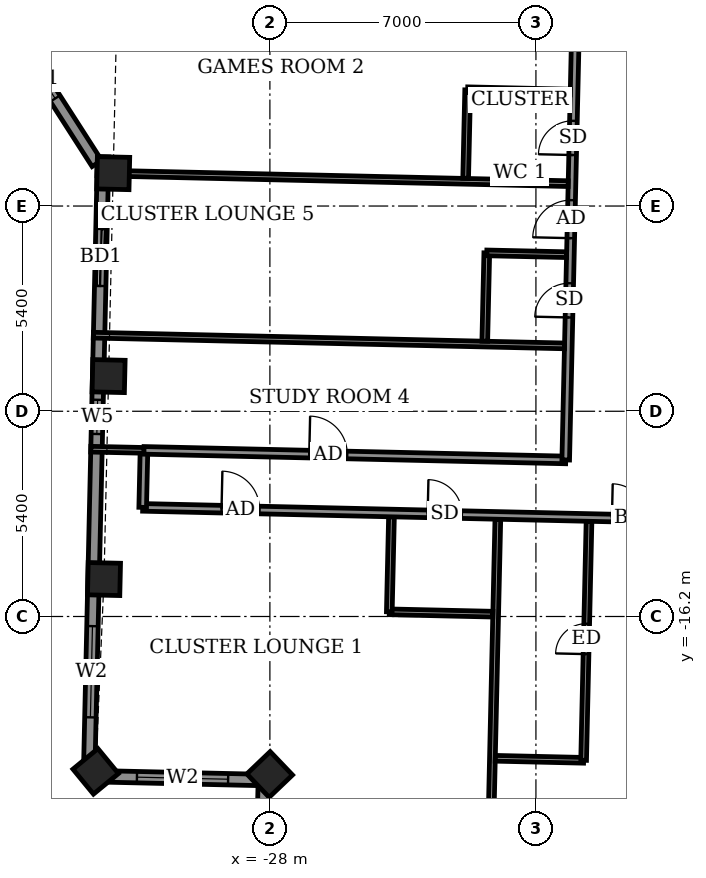
"""IFC4 building model, lengths in metres.
Left out: names, types, materials, properties, quantities, classifications, styles, units other than length and angle.
Written with IfcOpenShell. Run it as: python <this file> out.ifc"""

import sys

from ifc_helpers import new_model, si_unit, direction, frame, frame_2d, origin, origin_2d, place, context, subcontext, project, spatial, rectangle, extrude, element, fill, save


model = new_model("IFC4")
c1 = context("Model", 3, precision=1e-05, world=origin(), true_north=direction((0.0, 1.0)))
c2 = subcontext(c1, "Body", "Model", "MODEL_VIEW")
j1 = project(units=[si_unit("LENGTHUNIT", "METRE"), si_unit("PLANEANGLEUNIT", "RADIAN")], contexts=[c1])
p1 = place(None, origin())
s1 = spatial("IfcSite", under=j1, at=p1, CompositionType="ELEMENT")
p2 = place(p1, origin())
s2 = spatial("IfcBuilding", under=s1, at=p2, CompositionType="ELEMENT")
p3 = place(p2, frame((0.0, 0.0, 316.9)))
s3 = spatial("IfcBuildingStorey", under=s2, at=p3, CompositionType="ELEMENT", Elevation=316.9)
for number, where, z_axis, x_axis in (
    (1, (-32.123, -4.535, -0.55), (0.0, 0.0, 1.0), (-0.023, -1.0, 0.0)),
    (2, (-32.244, -9.875, -0.55), (0.0, 0.0, 1.0), (-0.023, -1.0, 0.0)),
    (3, (-32.365, -15.215, -0.55), (0.0, 0.0, 1.0), (-0.023, -1.0, 0.0)),
    (4, (-32.584, -20.275, -0.55), (0.0, 0.0, 1.0), (0.635, -0.772, 0.0)),
    (5, (-28.006, -20.356, -0.55), (0.0, 0.0, 1.0), (0.691, -0.723, 0.0)),
):
    element("IfcColumn", number, at=place(p3, frame(where, z_axis=z_axis, x_axis=x_axis)), inside=s3, PredefinedType="COLUMN", context=c2, shape_type="SweptSolid", body=[
        extrude(rectangle(XDim=0.85, YDim=0.85, at=origin_2d()), origin(), (0.0, 0.0, 1.0), 3.6),
    ])
p4 = place(p3, frame((-34.481, -1.277, 0.0), z_axis=(0.0, 0.0, 1.0), x_axis=(0.540460234606, -0.841369558999, 0.0)))
e6 = element("IfcWall", 6, at=p4, inside=s3, PredefinedType="SOLIDWALL", context=c2, shape_type="SweptSolid", body=[
    extrude(rectangle(XDim=3.569, YDim=0.3, at=frame_2d((1.785, 0.0))), origin(), (0.0, 0.0, 1.0), 3.05),
])
p5 = place(p4, frame((0.338, 0.0, 0.9)))
e7 = element("IfcOpeningElement", 7, at=p5, cuts=e6, PredefinedType="OPENING", context=c2, shape_type="SweptSolid", body=[
    extrude(rectangle(XDim=1.2, YDim=1.5, at=frame_2d((0.6, 0.75))), frame((0.0, 0.16, 0.0), z_axis=(0.0, -1.0, 0.0), x_axis=(1.0, 0.0, 0.0)), (0.0, 0.0, 1.0), 0.32),
])
p6 = place(p3, frame((-32.388, -4.104, 0.0), z_axis=(0.0, 0.0, 1.0), x_axis=(-0.02270779533, -0.999742144771, 0.0)))
e8 = element("IfcWall", 8, at=p6, inside=s3, PredefinedType="SOLIDWALL", context=c2, shape_type="SweptSolid", body=[
    extrude(rectangle(XDim=16.299, YDim=0.3, at=frame_2d((8.149, 0.0))), origin(), (0.0, 0.0, 1.0), 2.55),
])
p7 = place(p6, frame((1.9, 0.0, 0.0)))
e9 = element("IfcOpeningElement", 9, at=p7, cuts=e8, PredefinedType="OPENING", context=c2, shape_type="SweptSolid", body=[
    extrude(rectangle(XDim=1.5, YDim=2.4, at=frame_2d((0.75, 1.2))), frame((0.0, 0.16, 0.0), z_axis=(0.0, -1.0, 0.0), x_axis=(1.0, 0.0, 0.0)), (0.0, 0.0, 1.0), 0.32),
])
p8 = place(p6, frame((6.396, 0.0, 0.9)))
e10 = element("IfcOpeningElement", 10, at=p8, cuts=e8, PredefinedType="OPENING", context=c2, shape_type="SweptSolid", body=[
    extrude(rectangle(XDim=0.9, YDim=1.5, at=frame_2d((0.45, 0.75))), frame((0.0, 0.16, 0.0), z_axis=(0.0, -1.0, 0.0), x_axis=(1.0, 0.0, 0.0)), (0.0, 0.0, 1.0), 0.32),
])
p9 = place(p6, frame((12.353, 0.0, 0.9)))
e11 = element("IfcOpeningElement", 11, at=p9, cuts=e8, PredefinedType="OPENING", context=c2, shape_type="SweptSolid", body=[
    extrude(rectangle(XDim=2.4, YDim=1.5, at=frame_2d((1.2, 0.75))), frame((0.0, 0.16, 0.0), z_axis=(0.0, -1.0, 0.0), x_axis=(1.0, 0.0, 0.0)), (0.0, 0.0, 1.0), 0.32),
])
p10 = place(p3, frame((-32.758, -20.399, 0.0), z_axis=(0.0, 0.0, 1.0), x_axis=(0.999744404568, -0.02260808559, 0.0)))
e12 = element("IfcWall", 12, at=p10, inside=s3, PredefinedType="SOLIDWALL", context=c2, shape_type="SweptSolid", body=[
    extrude(rectangle(XDim=4.6, YDim=0.3, at=frame_2d((2.3, 0.0))), origin(), (0.0, 0.0, 1.0), 2.55),
])
p11 = place(p10, frame((1.26, 0.0, 0.9)))
e13 = element("IfcOpeningElement", 13, at=p11, cuts=e12, PredefinedType="OPENING", context=c2, shape_type="SweptSolid", body=[
    extrude(rectangle(XDim=2.4, YDim=1.5, at=frame_2d((1.2, 0.75))), frame((0.0, 0.16, 0.0), z_axis=(0.0, -1.0, 0.0), x_axis=(1.0, 0.0, 0.0)), (0.0, 0.0, 1.0), 0.32),
])
p12 = place(p3, frame((-28.159, -20.503, 0.0), z_axis=(0.0, 0.0, 1.0), x_axis=(-0.022820258049, -0.999739584003, 0.0)))
e14 = element("IfcWall", 14, at=p12, inside=s3, PredefinedType="SOLIDWALL", context=c2, shape_type="SweptSolid", body=[
    extrude(rectangle(XDim=4.6, YDim=0.3, at=frame_2d((2.3, 0.0))), origin(), (0.0, 0.0, 1.0), 2.55),
])
p13 = place(p12, frame((0.928, 0.0, 0.9)))
e15 = element("IfcOpeningElement", 15, at=p13, cuts=e14, PredefinedType="OPENING", context=c2, shape_type="SweptSolid", body=[
    extrude(rectangle(XDim=2.4, YDim=1.5, at=frame_2d((1.2, 0.75))), frame((0.0, 0.16, 0.0), z_axis=(0.0, -1.0, 0.0), x_axis=(1.0, 0.0, 0.0)), (0.0, 0.0, 1.0), 0.32),
])
p14 = place(p3, frame((-22.262, -25.088, 0.0), z_axis=(0.0, 0.0, 1.0), x_axis=(0.022708812003, 0.999742121678, 0.0)))
e16 = element("IfcWall", 16, at=p14, inside=s3, PredefinedType="PARTITIONING", context=c2, shape_type="SweptSolid", body=[
    extrude(rectangle(XDim=11.45, YDim=0.15, at=frame_2d((5.725, 0.0))), origin(), (0.0, 0.0, 1.0), 2.5),
])
p15 = place(p3, frame((-22.07, -19.931, 0.0), z_axis=(0.0, 0.0, 1.0), x_axis=(0.999740478815, -0.022781023197, 0.0)))
e17 = element("IfcWall", 17, at=p15, inside=s3, PredefinedType="PARTITIONING", context=c2, shape_type="SweptSolid", body=[
    extrude(rectangle(XDim=2.325, YDim=0.15, at=frame_2d((1.163, 0.0))), origin(), (0.0, 0.0, 1.0), 3.05),
])
p16 = place(p3, frame((-19.745, -19.984, 0.0), z_axis=(0.0, 0.0, 1.0), x_axis=(0.022591786368, 0.999744773024, 0.0)))
e18 = element("IfcWall", 18, at=p16, inside=s3, PredefinedType="PARTITIONING", context=c2, shape_type="SweptSolid", body=[
    extrude(rectangle(XDim=6.29, YDim=0.15, at=frame_2d((3.145, 0.0))), origin(), (0.0, 0.0, 1.0), 3.05),
])
p17 = place(p16, frame((2.795, 0.0, 0.0)))
e19 = element("IfcOpeningElement", 19, at=p17, cuts=e18, PredefinedType="OPENING", context=c2, shape_type="SweptSolid", body=[
    extrude(rectangle(XDim=0.8, YDim=2.1, at=frame_2d((0.4, 1.05))), frame((0.0, 0.085, 0.0), z_axis=(0.0, -1.0, 0.0), x_axis=(1.0, 0.0, 0.0)), (0.0, 0.0, 1.0), 0.17),
])
p18 = place(p3, frame((-24.858, -16.077, 0.0), z_axis=(0.0, 0.0, 1.0), x_axis=(0.999740955847, -0.022760079124, 0.0)))
e20 = element("IfcWall", 20, at=p18, inside=s3, PredefinedType="PARTITIONING", context=c2, shape_type="SweptSolid", body=[
    extrude(rectangle(XDim=2.725, YDim=0.15, at=frame_2d((1.362, 0.0))), origin(), (0.0, 0.0, 1.0), 3.05),
])
p19 = place(p3, frame((-24.858, -16.077, 0.0), z_axis=(0.0, 0.0, 1.0), x_axis=(0.022756903044, 0.999741028149, 0.0)))
e21 = element("IfcWall", 21, at=p19, inside=s3, PredefinedType="PARTITIONING", context=c2, shape_type="SweptSolid", body=[
    extrude(rectangle(XDim=2.5, YDim=0.15, at=frame_2d((1.25, 0.0))), origin(), (0.0, 0.0, 1.0), 3.05),
])
p20 = place(p3, frame((-31.347, -13.329, 0.0), z_axis=(0.0, 0.0, 1.0), x_axis=(0.999742613079, -0.022687168058, 0.0)))
e22 = element("IfcWall", 22, at=p20, inside=s3, PredefinedType="PARTITIONING", context=c2, shape_type="SweptSolid", body=[
    extrude(rectangle(XDim=58.799, YDim=0.2, at=frame_2d((29.399, 0.0))), origin(), (0.0, 0.0, 1.0), 3.05),
])
p21 = place(p20, frame((2.075, 0.0, 0.0)))
e23 = element("IfcOpeningElement", 23, at=p21, cuts=e22, PredefinedType="OPENING", context=c2, shape_type="SweptSolid", body=[
    extrude(rectangle(XDim=1.0, YDim=2.1, at=frame_2d((0.5, 1.05))), frame((0.0, 0.11, 0.0), z_axis=(0.0, -1.0, 0.0), x_axis=(1.0, 0.0, 0.0)), (0.0, 0.0, 1.0), 0.22),
])
p22 = place(p20, frame((7.5, 0.0, 0.0)))
e24 = element("IfcOpeningElement", 24, at=p22, cuts=e22, PredefinedType="OPENING", context=c2, shape_type="SweptSolid", body=[
    extrude(rectangle(XDim=0.9, YDim=2.1, at=frame_2d((0.45, 1.05))), frame((0.0, 0.11, 0.0), z_axis=(0.0, -1.0, 0.0), x_axis=(1.0, 0.0, 0.0)), (0.0, 0.0, 1.0), 0.22),
])
p23 = place(p20, frame((12.35, 0.0, 0.0)))
e25 = element("IfcOpeningElement", 25, at=p23, cuts=e22, PredefinedType="OPENING", context=c2, shape_type="SweptSolid", body=[
    extrude(rectangle(XDim=0.9, YDim=2.1, at=frame_2d((0.45, 1.05))), frame((0.0, 0.11, 0.0), z_axis=(0.0, -1.0, 0.0), x_axis=(1.0, 0.0, 0.0)), (0.0, 0.0, 1.0), 0.22),
])
p24 = place(p20, frame((14.425, 0.0, 0.0)))
e26 = element("IfcOpeningElement", 26, at=p24, cuts=e22, PredefinedType="OPENING", context=c2, shape_type="SweptSolid", body=[
    extrude(rectangle(XDim=0.9, YDim=2.1, at=frame_2d((0.45, 1.05))), frame((0.0, 0.11, 0.0), z_axis=(0.0, -1.0, 0.0), x_axis=(1.0, 0.0, 0.0)), (0.0, 0.0, 1.0), 0.22),
])
p25 = place(p20, frame((21.225, 0.0, 0.0)))
e27 = element("IfcOpeningElement", 27, at=p25, cuts=e22, PredefinedType="OPENING", context=c2, shape_type="SweptSolid", body=[
    extrude(rectangle(XDim=0.9, YDim=2.1, at=frame_2d((0.45, 1.05))), frame((0.0, 0.11, 0.0), z_axis=(0.0, -1.0, 0.0), x_axis=(1.0, 0.0, 0.0)), (0.0, 0.0, 1.0), 0.22),
])
p26 = place(p20, frame((23.25, 0.0, 0.0)))
e28 = element("IfcOpeningElement", 28, at=p26, cuts=e22, PredefinedType="OPENING", context=c2, shape_type="SweptSolid", body=[
    extrude(rectangle(XDim=0.9, YDim=2.1, at=frame_2d((0.45, 1.05))), frame((0.0, 0.11, 0.0), z_axis=(0.0, -1.0, 0.0), x_axis=(1.0, 0.0, 0.0)), (0.0, 0.0, 1.0), 0.22),
])
p27 = place(p20, frame((30.025, 0.0, 0.0)))
e29 = element("IfcOpeningElement", 29, at=p27, cuts=e22, PredefinedType="OPENING", context=c2, shape_type="SweptSolid", body=[
    extrude(rectangle(XDim=0.9, YDim=2.1, at=frame_2d((0.45, 1.05))), frame((0.0, 0.11, 0.0), z_axis=(0.0, -1.0, 0.0), x_axis=(1.0, 0.0, 0.0)), (0.0, 0.0, 1.0), 0.22),
])
p28 = place(p20, frame((32.025, 0.0, 0.0)))
e30 = element("IfcOpeningElement", 30, at=p28, cuts=e22, PredefinedType="OPENING", context=c2, shape_type="SweptSolid", body=[
    extrude(rectangle(XDim=0.9, YDim=2.1, at=frame_2d((0.45, 1.05))), frame((0.0, 0.11, 0.0), z_axis=(0.0, -1.0, 0.0), x_axis=(1.0, 0.0, 0.0)), (0.0, 0.0, 1.0), 0.22),
])
p29 = place(p20, frame((38.95, 0.0, 0.0)))
e31 = element("IfcOpeningElement", 31, at=p29, cuts=e22, PredefinedType="OPENING", context=c2, shape_type="SweptSolid", body=[
    extrude(rectangle(XDim=0.9, YDim=2.1, at=frame_2d((0.45, 1.05))), frame((0.0, 0.11, 0.0), z_axis=(0.0, -1.0, 0.0), x_axis=(1.0, 0.0, 0.0)), (0.0, 0.0, 1.0), 0.22),
])
p30 = place(p20, frame((41.05, 0.0, 0.0)))
e32 = element("IfcOpeningElement", 32, at=p30, cuts=e22, PredefinedType="OPENING", context=c2, shape_type="SweptSolid", body=[
    extrude(rectangle(XDim=0.9, YDim=2.1, at=frame_2d((0.45, 1.05))), frame((0.0, 0.11, 0.0), z_axis=(0.0, -1.0, 0.0), x_axis=(1.0, 0.0, 0.0)), (0.0, 0.0, 1.0), 0.22),
])
p31 = place(p20, frame((47.925, 0.0, 0.0)))
e33 = element("IfcOpeningElement", 33, at=p31, cuts=e22, PredefinedType="OPENING", context=c2, shape_type="SweptSolid", body=[
    extrude(rectangle(XDim=0.9, YDim=2.1, at=frame_2d((0.45, 1.05))), frame((0.0, 0.11, 0.0), z_axis=(0.0, -1.0, 0.0), x_axis=(1.0, 0.0, 0.0)), (0.0, 0.0, 1.0), 0.22),
])
p32 = place(p20, frame((53.618, 0.0, 0.0)))
e34 = element("IfcOpeningElement", 34, at=p32, cuts=e22, PredefinedType="OPENING", context=c2, shape_type="SweptSolid", body=[
    extrude(rectangle(XDim=1.0, YDim=2.1, at=frame_2d((0.5, 1.05))), frame((0.0, 0.11, 0.0), z_axis=(0.0, -1.0, 0.0), x_axis=(1.0, 0.0, 0.0)), (0.0, 0.0, 1.0), 0.22),
])
p33 = place(p3, frame((-31.347, -13.329, 0.0), z_axis=(0.0, 0.0, 1.0), x_axis=(0.022617910375, 0.999744182344, 0.0)))
e35 = element("IfcWall", 35, at=p33, inside=s3, PredefinedType="PARTITIONING", context=c2, shape_type="SweptSolid", body=[
    extrude(rectangle(XDim=1.5, YDim=0.2, at=frame_2d((0.75, 0.0))), origin(), (0.0, 0.0, 1.0), 3.05),
])
p34 = place(p3, frame((-32.713, -11.798, 0.0), z_axis=(0.0, 0.0, 1.0), x_axis=(0.999756172383, -0.022081571112, 0.0)))
e36 = element("IfcWall", 36, at=p34, inside=s3, PredefinedType="PARTITIONING", context=c2, shape_type="SweptSolid", body=[
    extrude(rectangle(XDim=1.404, YDim=0.15, at=frame_2d((0.702, 0.0))), origin(), (0.0, 0.0, 1.0), 2.55),
])
p35 = place(p3, frame((-31.313, -11.829, 0.0), z_axis=(0.0, 0.0, 1.0), x_axis=(0.999742346277, -0.022698921993, 0.0)))
e37 = element("IfcWall", 37, at=p35, inside=s3, PredefinedType="PARTITIONING", context=c2, shape_type="SweptSolid", body=[
    extrude(rectangle(XDim=11.1, YDim=0.2, at=frame_2d((5.55, 0.0))), origin(), (0.0, 0.0, 1.0), 3.05),
])
p36 = place(p35, frame((4.35, 0.0, 0.0)))
e38 = element("IfcOpeningElement", 38, at=p36, cuts=e37, PredefinedType="OPENING", context=c2, shape_type="SweptSolid", body=[
    extrude(rectangle(XDim=1.0, YDim=2.1, at=frame_2d((0.5, 1.05))), frame((0.0, 0.11, 0.0), z_axis=(0.0, -1.0, 0.0), x_axis=(1.0, 0.0, 0.0)), (0.0, 0.0, 1.0), 0.22),
])
p37 = place(p3, frame((-20.216, -12.081, 0.0), z_axis=(0.0, 0.0, 1.0), x_axis=(0.02267447203, 0.999742901109, 0.0)))
e39 = element("IfcWall", 39, at=p37, inside=s3, PredefinedType="PARTITIONING", context=c2, shape_type="SweptSolid", body=[
    extrude(rectangle(XDim=27.65, YDim=0.2, at=frame_2d((13.825, 0.0))), origin(), (0.0, 0.0, 1.0), 3.05),
])
p38 = place(p37, frame((18.987, 0.0, 0.0)))
e40 = element("IfcOpeningElement", 40, at=p38, cuts=e39, PredefinedType="OPENING", context=c2, shape_type="SweptSolid", body=[
    extrude(rectangle(XDim=1.0, YDim=2.1, at=frame_2d((0.5, 1.05))), frame((0.0, 0.11, 0.0), z_axis=(0.0, -1.0, 0.0), x_axis=(1.0, 0.0, 0.0)), (0.0, 0.0, 1.0), 0.22),
])
p39 = place(p37, frame((15.005, 0.0, 0.0)))
e41 = element("IfcOpeningElement", 41, at=p39, cuts=e39, PredefinedType="OPENING", context=c2, shape_type="SweptSolid", body=[
    extrude(rectangle(XDim=1.0, YDim=2.1, at=frame_2d((0.5, 1.05))), frame((0.0, 0.11, 0.0), z_axis=(0.0, -1.0, 0.0), x_axis=(1.0, 0.0, 0.0)), (0.0, 0.0, 1.0), 0.22),
])
p40 = place(p37, frame((10.85, 0.0, 0.0)))
e42 = element("IfcOpeningElement", 42, at=p40, cuts=e39, PredefinedType="OPENING", context=c2, shape_type="SweptSolid", body=[
    extrude(rectangle(XDim=1.0, YDim=2.1, at=frame_2d((0.5, 1.05))), frame((0.0, 0.11, 0.0), z_axis=(0.0, -1.0, 0.0), x_axis=(1.0, 0.0, 0.0)), (0.0, 0.0, 1.0), 0.22),
])
p41 = place(p37, frame((8.025, 0.0, 0.0)))
e43 = element("IfcOpeningElement", 43, at=p41, cuts=e39, PredefinedType="OPENING", context=c2, shape_type="SweptSolid", body=[
    extrude(rectangle(XDim=0.9, YDim=2.1, at=frame_2d((0.45, 1.05))), frame((0.0, 0.11, 0.0), z_axis=(0.0, -1.0, 0.0), x_axis=(1.0, 0.0, 0.0)), (0.0, 0.0, 1.0), 0.22),
])
p42 = place(p37, frame((5.837, 0.0, 0.0)))
e44 = element("IfcOpeningElement", 44, at=p42, cuts=e39, PredefinedType="OPENING", context=c2, shape_type="SweptSolid", body=[
    extrude(rectangle(XDim=1.0, YDim=2.1, at=frame_2d((0.5, 1.05))), frame((0.0, 0.11, 0.0), z_axis=(0.0, -1.0, 0.0), x_axis=(1.0, 0.0, 0.0)), (0.0, 0.0, 1.0), 0.22),
])
p43 = place(p37, frame((3.75, 0.0, 0.0)))
e45 = element("IfcOpeningElement", 45, at=p43, cuts=e39, PredefinedType="OPENING", context=c2, shape_type="SweptSolid", body=[
    extrude(rectangle(XDim=0.9, YDim=2.1, at=frame_2d((0.45, 1.05))), frame((0.0, 0.11, 0.0), z_axis=(0.0, -1.0, 0.0), x_axis=(1.0, 0.0, 0.0)), (0.0, 0.0, 1.0), 0.22),
])
p44 = place(p3, frame((-32.645, -8.798, 0.0), z_axis=(0.0, 0.0, 1.0), x_axis=(0.999741408463, -0.022740189192, 0.0)))
e46 = element("IfcWall", 46, at=p44, inside=s3, PredefinedType="PARTITIONING", context=c2, shape_type="SweptSolid", body=[
    extrude(rectangle(XDim=12.4, YDim=0.15, at=frame_2d((6.2, 0.0))), origin(), (0.0, 0.0, 1.0), 2.55),
])
p45 = place(p3, frame((-22.346, -8.957, 0.0), z_axis=(0.0, 0.0, 1.0), x_axis=(0.02279059109, 0.999740260747, 0.0)))
e47 = element("IfcWall", 47, at=p45, inside=s3, PredefinedType="PARTITIONING", context=c2, shape_type="SweptSolid", body=[
    extrude(rectangle(XDim=2.324, YDim=0.15, at=frame_2d((1.162, 0.0))), origin(), (0.0, 0.0, 1.0), 3.05),
])
p46 = place(p3, frame((-22.293, -6.633, 0.0), z_axis=(0.0, 0.0, 1.0), x_axis=(0.999750703499, -0.022327804475, 0.0)))
e48 = element("IfcWall", 48, at=p46, inside=s3, PredefinedType="PARTITIONING", context=c2, shape_type="SweptSolid", body=[
    extrude(rectangle(XDim=2.099, YDim=0.15, at=frame_2d((1.05, 0.0))), origin(), (0.0, 0.0, 1.0), 3.05),
])
p47 = place(p3, frame((-32.548, -4.529, 0.0), z_axis=(0.0, 0.0, 1.0), x_axis=(0.999741418644, -0.022739741597, 0.0)))
e49 = element("IfcWall", 49, at=p47, inside=s3, PredefinedType="PARTITIONING", context=c2, shape_type="SweptSolid", body=[
    extrude(rectangle(XDim=12.4, YDim=0.15, at=frame_2d((6.2, 0.0))), origin(), (0.0, 0.0, 1.0), 3.05),
])
p48 = place(p3, frame((-22.849, -4.67, 0.0), z_axis=(0.0, 0.0, 1.0), x_axis=(0.022885950011, 0.999738082346, 0.0)))
e50 = element("IfcWall", 50, at=p48, inside=s3, PredefinedType="PARTITIONING", context=c2, shape_type="SweptSolid", body=[
    extrude(rectangle(XDim=2.325, YDim=0.15, at=frame_2d((1.163, 0.0))), origin(), (0.0, 0.0, 1.0), 3.05),
])
p49 = place(p3, frame((-22.796, -2.34, 0.0), z_axis=(0.0, 0.0, 1.0), x_axis=(0.999746436932, -0.022518033722, 0.0)))
e51 = element("IfcWall", 51, at=p49, inside=s3, PredefinedType="PARTITIONING", context=c2, shape_type="SweptSolid", body=[
    extrude(rectangle(XDim=2.7, YDim=0.15, at=frame_2d((1.35, 0.0))), origin(), (0.0, 0.0, 1.0), 3.05),
])
p50 = place(p5, origin())
e52 = element("IfcWindow", 52, at=p50, inside=s3, PartitioningType="SINGLE_PANEL", PredefinedType="WINDOW", context=c2, shape_type="SweptSolid", body=[
    extrude(rectangle(XDim=1.2, YDim=1.5, at=frame_2d((0.6, 0.75))), frame((0.0, 0.03, 0.0), z_axis=(0.0, -1.0, 0.0), x_axis=(1.0, 0.0, 0.0)), (0.0, 0.0, 1.0), 0.06),
])
fill(e7, e52)
p51 = place(p7, origin())
e53 = element("IfcDoor", 53, at=p51, inside=s3, OperationType="SLIDING_TO_LEFT", PredefinedType="DOOR", context=c2, shape_type="SweptSolid", body=[
    extrude(rectangle(XDim=1.5, YDim=2.4, at=frame_2d((0.75, 1.2))), frame((0.0, 0.025, 0.0), z_axis=(0.0, -1.0, 0.0), x_axis=(1.0, 0.0, 0.0)), (0.0, 0.0, 1.0), 0.05),
])
fill(e9, e53)
p52 = place(p8, origin())
e54 = element("IfcWindow", 54, at=p52, inside=s3, PartitioningType="SINGLE_PANEL", PredefinedType="WINDOW", context=c2, shape_type="SweptSolid", body=[
    extrude(rectangle(XDim=0.9, YDim=1.5, at=frame_2d((0.45, 0.75))), frame((0.0, 0.03, 0.0), z_axis=(0.0, -1.0, 0.0), x_axis=(1.0, 0.0, 0.0)), (0.0, 0.0, 1.0), 0.06),
])
fill(e10, e54)
p53 = place(p9, origin())
e55 = element("IfcWindow", 55, at=p53, inside=s3, PartitioningType="DOUBLE_PANEL_VERTICAL", PredefinedType="WINDOW", context=c2, shape_type="SweptSolid", body=[
    extrude(rectangle(XDim=2.4, YDim=1.5, at=frame_2d((1.2, 0.75))), frame((0.0, 0.03, 0.0), z_axis=(0.0, -1.0, 0.0), x_axis=(1.0, 0.0, 0.0)), (0.0, 0.0, 1.0), 0.06),
])
fill(e11, e55)
p54 = place(p11, origin())
e56 = element("IfcWindow", 56, at=p54, inside=s3, PartitioningType="DOUBLE_PANEL_VERTICAL", PredefinedType="WINDOW", context=c2, shape_type="SweptSolid", body=[
    extrude(rectangle(XDim=2.4, YDim=1.5, at=frame_2d((1.2, 0.75))), frame((0.0, 0.03, 0.0), z_axis=(0.0, -1.0, 0.0), x_axis=(1.0, 0.0, 0.0)), (0.0, 0.0, 1.0), 0.06),
])
fill(e13, e56)
p55 = place(p21, origin())
e57 = element("IfcDoor", 57, at=p55, inside=s3, OperationType="SINGLE_SWING_LEFT", PredefinedType="DOOR", context=c2, shape_type="SweptSolid", body=[
    extrude(rectangle(XDim=1.0, YDim=2.1, at=frame_2d((0.5, 1.05))), frame((0.0, 0.025, 0.0), z_axis=(0.0, -1.0, 0.0), x_axis=(1.0, 0.0, 0.0)), (0.0, 0.0, 1.0), 0.05),
])
fill(e23, e57)
p56 = place(p22, origin())
e58 = element("IfcDoor", 58, at=p56, inside=s3, OperationType="SINGLE_SWING_LEFT", PredefinedType="DOOR", context=c2, shape_type="SweptSolid", body=[
    extrude(rectangle(XDim=0.9, YDim=2.1, at=frame_2d((0.45, 1.05))), frame((0.0, 0.025, 0.0), z_axis=(0.0, -1.0, 0.0), x_axis=(1.0, 0.0, 0.0)), (0.0, 0.0, 1.0), 0.05),
])
fill(e24, e58)
p57 = place(p23, origin())
e59 = element("IfcDoor", 59, at=p57, inside=s3, OperationType="SINGLE_SWING_LEFT", PredefinedType="DOOR", context=c2, shape_type="SweptSolid", body=[
    extrude(rectangle(XDim=0.9, YDim=2.1, at=frame_2d((0.45, 1.05))), frame((0.0, 0.025, 0.0), z_axis=(0.0, -1.0, 0.0), x_axis=(1.0, 0.0, 0.0)), (0.0, 0.0, 1.0), 0.05),
])
fill(e25, e59)
p58 = place(p17, origin())
e60 = element("IfcDoor", 60, at=p58, inside=s3, OperationType="SINGLE_SWING_LEFT", PredefinedType="DOOR", context=c2, shape_type="SweptSolid", body=[
    extrude(rectangle(XDim=0.8, YDim=2.1, at=frame_2d((0.4, 1.05))), frame((0.0, 0.025, 0.0), z_axis=(0.0, -1.0, 0.0), x_axis=(1.0, 0.0, 0.0)), (0.0, 0.0, 1.0), 0.05),
])
fill(e19, e60)
p59 = place(p41, origin())
e61 = element("IfcDoor", 61, at=p59, inside=s3, OperationType="SINGLE_SWING_LEFT", PredefinedType="DOOR", context=c2, shape_type="SweptSolid", body=[
    extrude(rectangle(XDim=0.9, YDim=2.1, at=frame_2d((0.45, 1.05))), frame((0.0, 0.025, 0.0), z_axis=(0.0, -1.0, 0.0), x_axis=(1.0, 0.0, 0.0)), (0.0, 0.0, 1.0), 0.05),
])
fill(e43, e61)
p60 = place(p42, origin())
e62 = element("IfcDoor", 62, at=p60, inside=s3, OperationType="SINGLE_SWING_LEFT", PredefinedType="DOOR", context=c2, shape_type="SweptSolid", body=[
    extrude(rectangle(XDim=1.0, YDim=2.1, at=frame_2d((0.5, 1.05))), frame((0.0, 0.025, 0.0), z_axis=(0.0, -1.0, 0.0), x_axis=(1.0, 0.0, 0.0)), (0.0, 0.0, 1.0), 0.05),
])
fill(e44, e62)
p61 = place(p43, origin())
e63 = element("IfcDoor", 63, at=p61, inside=s3, OperationType="SINGLE_SWING_RIGHT", PredefinedType="DOOR", context=c2, shape_type="SweptSolid", body=[
    extrude(rectangle(XDim=0.9, YDim=2.1, at=frame_2d((0.45, 1.05))), frame((0.0, 0.025, 0.0), z_axis=(0.0, -1.0, 0.0), x_axis=(1.0, 0.0, 0.0)), (0.0, 0.0, 1.0), 0.05),
])
fill(e45, e63)
p62 = place(p36, origin())
e64 = element("IfcDoor", 64, at=p62, inside=s3, OperationType="SINGLE_SWING_RIGHT", PredefinedType="DOOR", context=c2, shape_type="SweptSolid", body=[
    extrude(rectangle(XDim=1.0, YDim=2.1, at=frame_2d((0.5, 1.05))), frame((0.0, 0.025, 0.0), z_axis=(0.0, -1.0, 0.0), x_axis=(1.0, 0.0, 0.0)), (0.0, 0.0, 1.0), 0.05),
])
fill(e38, e64)
save(model, sys.argv[1])
